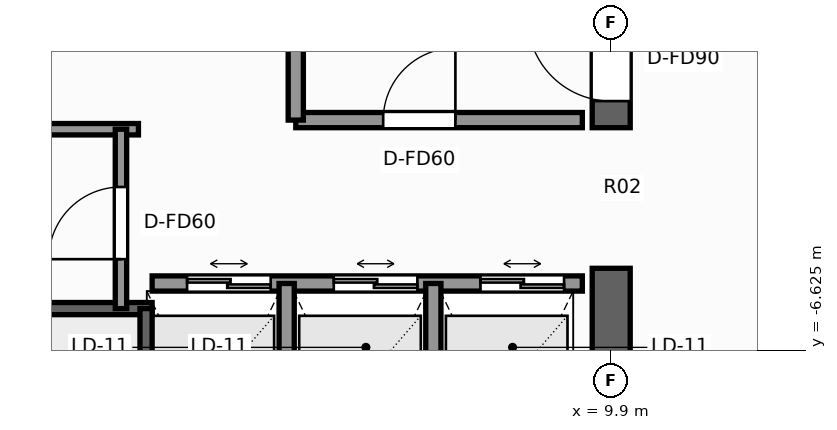
"""IFC4 building model, lengths in metres.
Left out: names, types, materials, properties, quantities, classifications, styles, units other than length and angle.
Written with IfcOpenShell. Run it as: python <this file> out.ifc"""

import sys

from ifc_helpers import new_model, si_unit, direction, frame, frame_2d, origin, place, context, subcontext, project, spatial, rectangle, extrude, element, fill, save


model = new_model("IFC4")
c1 = context("Model", 3, precision=1e-05, world=origin(), true_north=direction((0.0, 1.0)))
c2 = subcontext(c1, "Body", "Model", "MODEL_VIEW")
j1 = project(units=[si_unit("LENGTHUNIT", "METRE"), si_unit("PLANEANGLEUNIT", "RADIAN")], contexts=[c1])
p1 = place(None, origin())
s1 = spatial("IfcSite", under=j1, at=p1, CompositionType="ELEMENT")
p2 = place(p1, origin())
s2 = spatial("IfcBuilding", under=s1, at=p2, CompositionType="ELEMENT")
p3 = place(p2, frame((0.0, 0.0, 176.7)))
s3 = spatial("IfcBuildingStorey", under=s2, at=p3, CompositionType="ELEMENT", Elevation=176.7)
p4 = place(p3, frame((9.9, -9.65, 0.0), z_axis=(0.0, 0.0, 1.0), x_axis=(0.0, 1.0, 0.0)))
e1 = element("IfcWall", 1, at=p4, inside=s3, PredefinedType="SHEAR", context=c2, shape_type="SweptSolid", body=[
    extrude(rectangle(XDim=4.1, YDim=0.5, at=frame_2d((2.05, 0.0))), origin(), (0.0, 0.0, 1.0), 3.3),
])
p5 = place(p3, frame((9.9, -3.7, 0.0), z_axis=(0.0, 0.0, 1.0), x_axis=(0.0, 1.0, 0.0)))
e2 = element("IfcWall", 2, at=p5, inside=s3, PredefinedType="SHEAR", context=c2, shape_type="SweptSolid", body=[
    extrude(rectangle(XDim=13.35, YDim=0.5, at=frame_2d((6.675, 0.0))), origin(), (0.0, 0.0, 1.0), 3.3),
])
p6 = place(p5, frame((0.35, 0.0, 0.0)))
e3 = element("IfcOpeningElement", 3, at=p6, cuts=e2, PredefinedType="OPENING", context=c2, shape_type="SweptSolid", body=[
    extrude(rectangle(XDim=1.1, YDim=2.2, at=frame_2d((0.55, 1.1))), frame((0.0, 0.26, 0.0), z_axis=(0.0, -1.0, 0.0), x_axis=(1.0, 0.0, 0.0)), (0.0, 0.0, 1.0), 0.52),
])
p7 = place(p3, frame((-3.86, -6.08, 0.0), z_axis=(0.0, 0.0, 1.0), x_axis=(1.0, 0.0, 0.0)))
e4 = element("IfcWall", 4, at=p7, inside=s3, PredefinedType="SHEAR", context=c2, shape_type="SweptSolid", body=[
    extrude(rectangle(XDim=7.72, YDim=0.16, at=frame_2d((3.86, 0.0))), origin(), (0.0, 0.0, 1.0), 3.3),
])
p8 = place(p3, frame((3.78, -9.43, 0.0), z_axis=(0.0, 0.0, 1.0), x_axis=(0.0, 1.0, 0.0)))
e5 = element("IfcWall", 5, at=p8, inside=s3, PredefinedType="SHEAR", context=c2, shape_type="SweptSolid", body=[
    extrude(rectangle(XDim=3.35, YDim=0.16, at=frame_2d((1.675, 0.0))), origin(), (0.0, 0.0, 1.0), 3.3),
])
p9 = place(p3, frame((5.75, -3.6, 0.0), z_axis=(0.0, 0.0, 1.0), x_axis=(1.0, 0.0, 0.0)))
e6 = element("IfcWall", 6, at=p9, inside=s3, PredefinedType="SOLIDWALL", context=c2, shape_type="SweptSolid", body=[
    extrude(rectangle(XDim=3.77, YDim=0.2, at=frame_2d((1.885, 0.0))), origin(), (0.0, 0.0, 1.0), 3.08),
])
p10 = place(p9, frame((1.15, 0.0, 0.0)))
e7 = element("IfcOpeningElement", 7, at=p10, cuts=e6, PredefinedType="OPENING", context=c2, shape_type="SweptSolid", body=[
    extrude(rectangle(XDim=0.95, YDim=2.06, at=frame_2d((0.475, 1.03))), frame((0.0, 0.11, 0.0), z_axis=(0.0, -1.0, 0.0), x_axis=(1.0, 0.0, 0.0)), (0.0, 0.0, 1.0), 0.22),
])
p11 = place(p3, frame((5.75, -3.6, 0.0), z_axis=(0.0, 0.0, 1.0), x_axis=(0.0, 1.0, 0.0)))
e8 = element("IfcWall", 8, at=p11, inside=s3, PredefinedType="SOLIDWALL", context=c2, shape_type="SweptSolid", body=[
    extrude(rectangle(XDim=5.57, YDim=0.2, at=frame_2d((2.785, 0.0))), origin(), (0.0, 0.0, 1.0), 2.715),
])
p12 = place(p11, frame((2.75, 0.0, 0.0)))
e9 = element("IfcOpeningElement", 9, at=p12, cuts=e8, PredefinedType="OPENING", context=c2, shape_type="SweptSolid", body=[
    extrude(rectangle(XDim=1.1, YDim=2.2, at=frame_2d((0.55, 1.1))), frame((0.0, 0.11, 0.0), z_axis=(0.0, -1.0, 0.0), x_axis=(1.0, 0.0, 0.0)), (0.0, 0.0, 1.0), 0.22),
])
p13 = place(p3, frame((3.86, -5.75, 0.0), z_axis=(0.0, 0.0, 1.0), x_axis=(1.0, 0.0, 0.0)))
e10 = element("IfcWall", 10, at=p13, inside=s3, PredefinedType="SOLIDWALL", context=c2, shape_type="SweptSolid", body=[
    extrude(rectangle(XDim=5.66, YDim=0.2, at=frame_2d((2.83, 0.0))), origin(), (0.0, 0.0, 1.0), 3.08),
])
p14 = place(p13, frame((0.46, 0.0, 0.0)))
e11 = element("IfcOpeningElement", 11, at=p14, cuts=e10, PredefinedType="OPENING", context=c2, shape_type="SweptSolid", body=[
    extrude(rectangle(XDim=1.1, YDim=2.2, at=frame_2d((0.55, 1.1))), frame((0.0, 0.11, 0.0), z_axis=(0.0, -1.0, 0.0), x_axis=(1.0, 0.0, 0.0)), (0.0, 0.0, 1.0), 0.22),
])
p15 = place(p13, frame((2.39, 0.0, 0.0)))
e12 = element("IfcOpeningElement", 12, at=p15, cuts=e10, PredefinedType="OPENING", context=c2, shape_type="SweptSolid", body=[
    extrude(rectangle(XDim=1.1, YDim=2.2, at=frame_2d((0.55, 1.1))), frame((0.0, 0.11, 0.0), z_axis=(0.0, -1.0, 0.0), x_axis=(1.0, 0.0, 0.0)), (0.0, 0.0, 1.0), 0.22),
])
p16 = place(p13, frame((4.32, 0.0, 0.0)))
e13 = element("IfcOpeningElement", 13, at=p16, cuts=e10, PredefinedType="OPENING", context=c2, shape_type="SweptSolid", body=[
    extrude(rectangle(XDim=1.1, YDim=2.2, at=frame_2d((0.55, 1.1))), frame((0.0, 0.11, 0.0), z_axis=(0.0, -1.0, 0.0), x_axis=(1.0, 0.0, 0.0)), (0.0, 0.0, 1.0), 0.22),
])
for number, where, z_axis, x_axis in (
    (14, (5.63, -9.52, 0.0), (0.0, 0.0, 1.0), (0.0, 1.0, 0.0)),
    (15, (7.56, -9.52, 0.0), (0.0, 0.0, 1.0), (0.0, 1.0, 0.0)),
):
    element("IfcWall", number, at=place(p3, frame(where, z_axis=z_axis, x_axis=x_axis)), inside=s3, PredefinedType="SOLIDWALL", context=c2, shape_type="SweptSolid", body=[
        extrude(rectangle(XDim=3.77, YDim=0.2, at=frame_2d((1.885, 0.0))), origin(), (0.0, 0.0, 1.0), 3.08),
    ])
p17 = place(p3, frame((-3.68, -3.72, 0.0), z_axis=(0.0, 0.0, 1.0), x_axis=(1.0, 0.0, 0.0)))
e16 = element("IfcWall", 16, at=p17, inside=s3, PredefinedType="PARTITIONING", context=c2, shape_type="SweptSolid", body=[
    extrude(rectangle(XDim=7.36, YDim=0.15, at=frame_2d((3.68, 0.0))), origin(), (0.0, 0.0, 1.0), 3.08),
])
p18 = place(p3, frame((3.45, -6.08, 0.0), z_axis=(0.0, 0.0, 1.0), x_axis=(0.0, 1.0, 0.0)))
e17 = element("IfcWall", 17, at=p18, inside=s3, PredefinedType="PARTITIONING", context=c2, shape_type="SweptSolid", body=[
    extrude(rectangle(XDim=2.36, YDim=0.15, at=frame_2d((1.18, 0.0))), origin(), (0.0, 0.0, 1.0), 3.08),
])
p19 = place(p18, frame((0.65, 0.0, 0.0)))
e18 = element("IfcOpeningElement", 18, at=p19, cuts=e17, PredefinedType="OPENING", context=c2, shape_type="SweptSolid", body=[
    extrude(rectangle(XDim=0.95, YDim=2.06, at=frame_2d((0.475, 1.03))), frame((0.0, 0.085, 0.0), z_axis=(0.0, -1.0, 0.0), x_axis=(1.0, 0.0, 0.0)), (0.0, 0.0, 1.0), 0.17),
])
p20 = place(p6, origin())
e19 = element("IfcDoor", 19, at=p20, inside=s3, OperationType="SINGLE_SWING_RIGHT", PredefinedType="DOOR", context=c2, shape_type="SweptSolid", body=[
    extrude(rectangle(XDim=1.1, YDim=2.2, at=frame_2d((0.55, 1.1))), frame((0.0, 0.025, 0.0), z_axis=(0.0, -1.0, 0.0), x_axis=(1.0, 0.0, 0.0)), (0.0, 0.0, 1.0), 0.05),
])
fill(e3, e19)
p21 = place(p14, origin())
e20 = element("IfcDoor", 20, at=p21, inside=s3, OperationType="DOUBLE_DOOR_SLIDING", PredefinedType="DOOR", context=c2, shape_type="SweptSolid", body=[
    extrude(rectangle(XDim=1.1, YDim=2.2, at=frame_2d((0.55, 1.1))), frame((0.0, 0.025, 0.0), z_axis=(0.0, -1.0, 0.0), x_axis=(1.0, 0.0, 0.0)), (0.0, 0.0, 1.0), 0.05),
])
fill(e11, e20)
p22 = place(p15, origin())
e21 = element("IfcDoor", 21, at=p22, inside=s3, OperationType="DOUBLE_DOOR_SLIDING", PredefinedType="DOOR", context=c2, shape_type="SweptSolid", body=[
    extrude(rectangle(XDim=1.1, YDim=2.2, at=frame_2d((0.55, 1.1))), frame((0.0, 0.025, 0.0), z_axis=(0.0, -1.0, 0.0), x_axis=(1.0, 0.0, 0.0)), (0.0, 0.0, 1.0), 0.05),
])
fill(e12, e21)
p23 = place(p16, origin())
e22 = element("IfcDoor", 22, at=p23, inside=s3, OperationType="DOUBLE_DOOR_SLIDING", PredefinedType="DOOR", context=c2, shape_type="SweptSolid", body=[
    extrude(rectangle(XDim=1.1, YDim=2.2, at=frame_2d((0.55, 1.1))), frame((0.0, 0.025, 0.0), z_axis=(0.0, -1.0, 0.0), x_axis=(1.0, 0.0, 0.0)), (0.0, 0.0, 1.0), 0.05),
])
fill(e13, e22)
p24 = place(p10, origin())
e23 = element("IfcDoor", 23, at=p24, inside=s3, OperationType="SINGLE_SWING_RIGHT", PredefinedType="DOOR", context=c2, shape_type="SweptSolid", body=[
    extrude(rectangle(XDim=0.95, YDim=2.06, at=frame_2d((0.475, 1.03))), frame((0.0, 0.025, 0.0), z_axis=(0.0, -1.0, 0.0), x_axis=(1.0, 0.0, 0.0)), (0.0, 0.0, 1.0), 0.05),
])
fill(e7, e23)
p25 = place(p19, origin())
e24 = element("IfcDoor", 24, at=p25, inside=s3, OperationType="SINGLE_SWING_LEFT", PredefinedType="DOOR", context=c2, shape_type="SweptSolid", body=[
    extrude(rectangle(XDim=0.95, YDim=2.06, at=frame_2d((0.475, 1.03))), frame((0.0, 0.025, 0.0), z_axis=(0.0, -1.0, 0.0), x_axis=(1.0, 0.0, 0.0)), (0.0, 0.0, 1.0), 0.05),
])
fill(e18, e24)
save(model, sys.argv[1])
